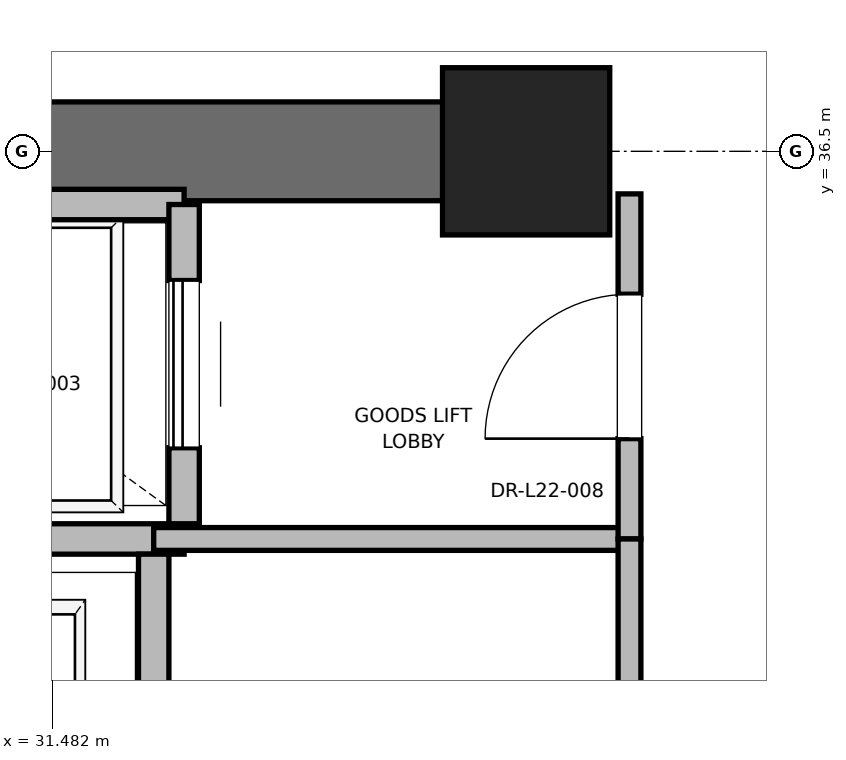
"""IFC4 building model, lengths in metres.
Left out: names, types, materials, properties, quantities, classifications, styles, units other than length and angle.
Written with IfcOpenShell. Run it as: python <this file> out.ifc"""

import sys

from ifc_helpers import new_model, si_unit, direction, frame, frame_2d, origin, origin_2d, place, context, subcontext, project, spatial, rectangle, extrude, element, fill, save


model = new_model("IFC4")
c1 = context("Model", 3, precision=1e-05, world=origin(), true_north=direction((0.0, 1.0)))
c2 = subcontext(c1, "Body", "Model", "MODEL_VIEW")
j1 = project(units=[si_unit("LENGTHUNIT", "METRE"), si_unit("PLANEANGLEUNIT", "RADIAN")], contexts=[c1])
p1 = place(None, origin())
s1 = spatial("IfcSite", under=j1, at=p1, CompositionType="ELEMENT")
p2 = place(p1, origin())
s2 = spatial("IfcBuilding", under=s1, at=p2, CompositionType="ELEMENT")
p3 = place(p2, frame((0.0, 0.0, 95.6)))
s3 = spatial("IfcBuildingStorey", under=s2, at=p3, CompositionType="ELEMENT", Elevation=95.6)
p4 = place(p3, frame((34.6, 36.5, 0.0), z_axis=(0.0, 0.0, 1.0), x_axis=(1.0, 0.0, 0.0)))
e1 = element("IfcColumn", 1, at=p4, inside=s3, PredefinedType="PILASTER", context=c2, shape_type="SweptSolid", body=[
    extrude(rectangle(XDim=1.1, YDim=1.1, at=origin_2d()), origin(), (0.0, 0.0, 1.0), 4.0),
])
p5 = place(p3, frame((29.0, 36.5, 0.0), z_axis=(0.0, 0.0, 1.0), x_axis=(1.0, 0.0, 0.0)))
e2 = element("IfcWall", 2, at=p5, inside=s3, PredefinedType="SHEAR", context=c2, shape_type="SweptSolid", body=[
    extrude(rectangle(XDim=5.8, YDim=0.65, at=frame_2d((2.9, 0.0))), origin(), (0.0, 0.0, 1.0), 3.76),
])
p6 = place(p3, frame((29.55, 33.95, 0.0), z_axis=(0.0, 0.0, 1.0), x_axis=(1.0, 0.0, 0.0)))
e3 = element("IfcWall", 3, at=p6, inside=s3, PredefinedType="SOLIDWALL", context=c2, shape_type="SweptSolid", body=[
    extrude(rectangle(XDim=2.8, YDim=0.2, at=frame_2d((1.4, 0.0))), origin(), (0.0, 0.0, 1.0), 3.76),
])
p7 = place(p3, frame((32.15, 30.85, 0.0), z_axis=(0.0, 0.0, 1.0), x_axis=(0.0, 1.0, 0.0)))
e4 = element("IfcWall", 4, at=p7, inside=s3, PredefinedType="SOLIDWALL", context=c2, shape_type="SweptSolid", body=[
    extrude(rectangle(XDim=3.0, YDim=0.2, at=frame_2d((1.5, 0.0))), origin(), (0.0, 0.0, 1.0), 3.76),
])
p8 = place(p3, frame((32.35, 36.15, 0.0), z_axis=(0.0, 0.0, 1.0), x_axis=(-1.0, 0.0, 0.0)))
e5 = element("IfcWall", 5, at=p8, inside=s3, PredefinedType="SOLIDWALL", context=c2, shape_type="SweptSolid", body=[
    extrude(rectangle(XDim=2.8, YDim=0.2, at=frame_2d((1.4, 0.0))), origin(), (0.0, 0.0, 1.0), 2.889),
])
p9 = place(p3, frame((32.35, 34.05, 0.0), z_axis=(0.0, 0.0, 1.0), x_axis=(0.0, 1.0, 0.0)))
e6 = element("IfcWall", 6, at=p9, inside=s3, PredefinedType="SOLIDWALL", context=c2, shape_type="SweptSolid", body=[
    extrude(rectangle(XDim=2.1, YDim=0.2, at=frame_2d((1.05, 0.0))), origin(), (0.0, 0.0, 1.0), 3.76),
])
p10 = place(p9, frame((0.5, 0.0, 0.0)))
e7 = element("IfcOpeningElement", 7, at=p10, cuts=e6, PredefinedType="OPENING", context=c2, shape_type="SweptSolid", body=[
    extrude(rectangle(XDim=1.1, YDim=2.2, at=frame_2d((0.55, 1.1))), frame((0.0, 0.1, 0.0), z_axis=(0.0, -1.0, 0.0), x_axis=(1.0, 0.0, 0.0)), (0.0, 0.0, 1.0), 0.2),
])
p11 = place(p3, frame((32.15, 33.95, 0.0), z_axis=(0.0, 0.0, 1.0), x_axis=(1.0, 0.0, 0.0)))
e8 = element("IfcWall", 8, at=p11, inside=s3, PredefinedType="PARTITIONING", context=c2, shape_type="SweptSolid", body=[
    extrude(rectangle(XDim=3.13, YDim=0.15, at=frame_2d((1.565, 0.0))), origin(), (0.0, 0.0, 1.0), 2.85),
])
p12 = place(p3, frame((35.28, 33.95, 0.0), z_axis=(0.0, 0.0, 1.0), x_axis=(0.0, 1.0, 0.0)))
e9 = element("IfcWall", 9, at=p12, inside=s3, PredefinedType="PARTITIONING", context=c2, shape_type="SweptSolid", body=[
    extrude(rectangle(XDim=2.27, YDim=0.15, at=frame_2d((1.135, 0.0))), origin(), (0.0, 0.0, 1.0), 2.54),
])
p13 = place(p12, frame((0.66, 0.0, 0.0)))
e10 = element("IfcOpeningElement", 10, at=p13, cuts=e9, PredefinedType="OPENING", context=c2, shape_type="SweptSolid", body=[
    extrude(rectangle(XDim=0.95, YDim=2.15, at=frame_2d((0.475, 1.075))), frame((0.0, 0.075, 0.0), z_axis=(0.0, -1.0, 0.0), x_axis=(1.0, 0.0, 0.0)), (0.0, 0.0, 1.0), 0.15),
])
p14 = place(p3, frame((35.28, 30.75, 0.0), z_axis=(0.0, 0.0, 1.0), x_axis=(0.0, 1.0, 0.0)))
e11 = element("IfcWall", 11, at=p14, inside=s3, PredefinedType="PARTITIONING", context=c2, shape_type="SweptSolid", body=[
    extrude(rectangle(XDim=3.2, YDim=0.15, at=frame_2d((1.6, 0.0))), origin(), (0.0, 0.0, 1.0), 2.85),
])
p15 = place(p14, frame((1.15, 0.0, 0.0)))
e12 = element("IfcOpeningElement", 12, at=p15, cuts=e11, PredefinedType="OPENING", context=c2, shape_type="SweptSolid", body=[
    extrude(rectangle(XDim=0.9, YDim=2.1, at=frame_2d((0.45, 1.05))), frame((0.0, 0.075, 0.0), z_axis=(0.0, -1.0, 0.0), x_axis=(1.0, 0.0, 0.0)), (0.0, 0.0, 1.0), 0.15),
])
p16 = place(p10, origin())
e13 = element("IfcDoor", 13, at=p16, inside=s3, OperationType="SLIDING_TO_RIGHT", PredefinedType="DOOR", context=c2, shape_type="SweptSolid", body=[
    extrude(rectangle(XDim=1.1, YDim=2.2, at=frame_2d((0.55, 1.1))), frame((0.0, 0.025, 0.0), z_axis=(0.0, -1.0, 0.0), x_axis=(1.0, 0.0, 0.0)), (0.0, 0.0, 1.0), 0.05),
])
fill(e7, e13)
p17 = place(p13, origin())
e14 = element("IfcDoor", 14, at=p17, inside=s3, OperationType="SINGLE_SWING_LEFT", PredefinedType="DOOR", context=c2, shape_type="SweptSolid", body=[
    extrude(rectangle(XDim=0.95, YDim=2.15, at=frame_2d((0.475, 1.075))), frame((0.0, 0.025, 0.0), z_axis=(0.0, -1.0, 0.0), x_axis=(1.0, 0.0, 0.0)), (0.0, 0.0, 1.0), 0.05),
])
fill(e10, e14)
save(model, sys.argv[1])
